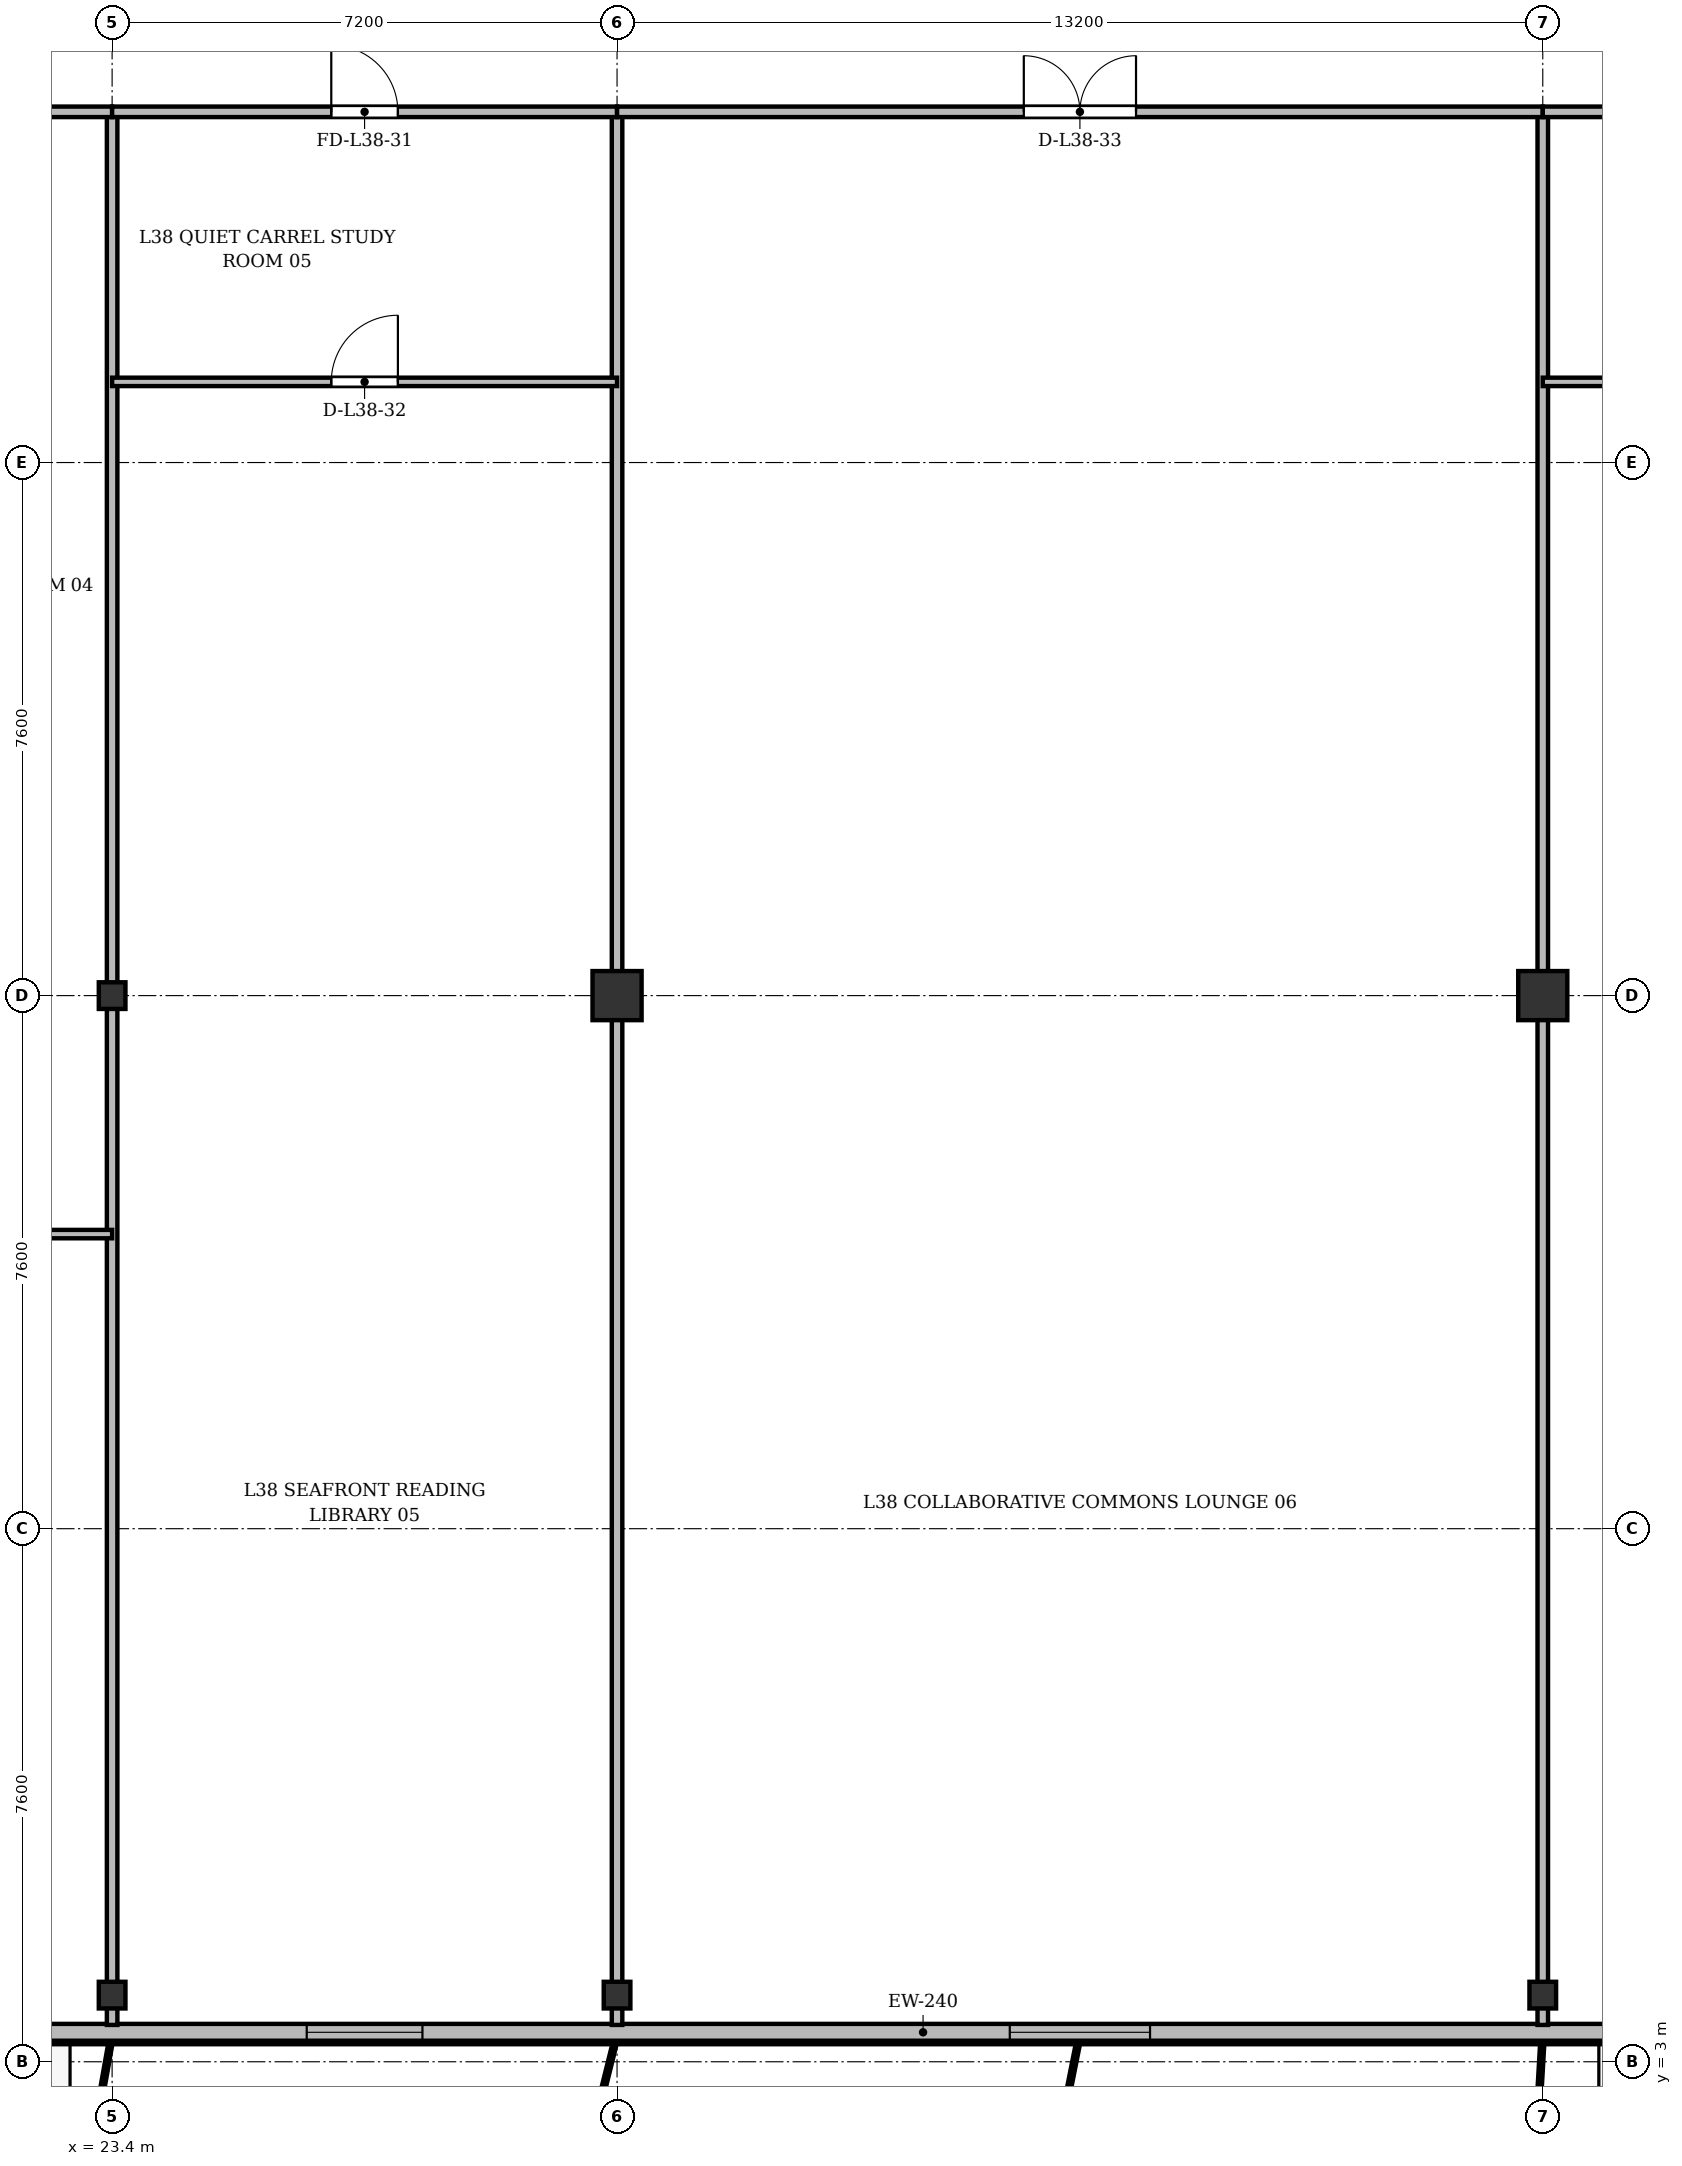
"""IFC4 building model, lengths in metres.
Left out: names, types, materials, properties, quantities, classifications, styles, units other than length and angle.
Written with IfcOpenShell. Run it as: python <this file> out.ifc"""

import sys

from ifc_helpers import new_model, si_unit, direction, frame, frame_2d, origin, origin_2d, place, context, subcontext, project, spatial, rectangle, i_section, extrude, source, transform, mapped, element, fill, save


model = new_model("IFC4")
c1 = context("Model", 3, precision=1e-05, world=origin(), true_north=direction((0.0, 1.0)))
c2 = subcontext(c1, "Body", "Model", "MODEL_VIEW")
j1 = project(units=[si_unit("LENGTHUNIT", "METRE"), si_unit("PLANEANGLEUNIT", "RADIAN")], contexts=[c1])
p1 = place(None, origin())
s1 = spatial("IfcSite", under=j1, at=p1, CompositionType="ELEMENT")
p2 = place(p1, origin())
s2 = spatial("IfcBuilding", under=s1, at=p2, CompositionType="ELEMENT")
p3 = place(p2, frame((0.0, 0.0, 146.5)))
s3 = spatial("IfcBuildingStorey", under=s2, at=p3, CompositionType="ELEMENT", Elevation=146.5)
m1 = source(origin(), c2, "Body", "SweptSolid", [
    extrude(i_section(OverallWidth=0.38, OverallDepth=0.38, WebThickness=0.02, FlangeThickness=0.03, at=origin_2d()), origin(), (0.0, 0.0, 1.0), 3.6),
])
for number, where, z_axis, x_axis in (
    (1, (23.4, 3.95, 0.0), (0.0, 0.0, 1.0), (1.0, 0.0, 0.0)),
    (2, (23.4, 18.2, 0.0), (0.0, 0.0, 1.0), (1.0, 0.0, 0.0)),
    (3, (30.6, 3.95, 0.0), (0.0, 0.0, 1.0), (1.0, 0.0, 0.0)),
):
    element("IfcColumn", number, at=place(p3, frame(where, z_axis=z_axis, x_axis=x_axis)), inside=s3, PredefinedType="COLUMN", context=c2, shape_type="MappedRepresentation", body=[
        mapped(m1, transform((0.0, 0.0, 0.0), x_axis=(1.0, 0.0, 0.0), y_axis=(0.0, 1.0, 0.0), z_axis=(0.0, 0.0, 1.0), scale=1.0)),
    ])
m2 = source(origin(), c2, "Body", "SweptSolid", [
    extrude(rectangle(XDim=0.7, YDim=0.7, at=origin_2d()), origin(), (0.0, 0.0, 1.0), 3.6),
])
p4 = place(p3, frame((30.6, 18.2, 0.0), z_axis=(0.0, 0.0, 1.0), x_axis=(1.0, 0.0, 0.0)))
e4 = element("IfcColumn", 4, at=p4, inside=s3, PredefinedType="COLUMN", context=c2, shape_type="MappedRepresentation", body=[
    mapped(m2, transform((0.0, 0.0, 0.0), x_axis=(1.0, 0.0, 0.0), y_axis=(0.0, 1.0, 0.0), z_axis=(0.0, 0.0, 1.0), scale=1.0)),
])
p5 = place(p3, frame((43.8, 3.95, 0.0), z_axis=(0.0, 0.0, 1.0), x_axis=(1.0, 0.0, 0.0)))
e5 = element("IfcColumn", 5, at=p5, inside=s3, PredefinedType="COLUMN", context=c2, shape_type="MappedRepresentation", body=[
    mapped(m1, transform((0.0, 0.0, 0.0), x_axis=(1.0, 0.0, 0.0), y_axis=(0.0, 1.0, 0.0), z_axis=(0.0, 0.0, 1.0), scale=1.0)),
])
p6 = place(p3, frame((43.8, 18.2, 0.0), z_axis=(0.0, 0.0, 1.0), x_axis=(1.0, 0.0, 0.0)))
e6 = element("IfcColumn", 6, at=p6, inside=s3, PredefinedType="COLUMN", context=c2, shape_type="MappedRepresentation", body=[
    mapped(m2, transform((0.0, 0.0, 0.0), x_axis=(1.0, 0.0, 0.0), y_axis=(0.0, 1.0, 0.0), z_axis=(0.0, 0.0, 1.0), scale=1.0)),
])
p7 = place(p3, frame((63.6, 3.42, 0.0), z_axis=(0.0, 0.0, 1.0), x_axis=(-1.0, 0.0, 0.0)))
e7 = element("IfcWall", 7, at=p7, inside=s3, PredefinedType="SOLIDWALL", context=c2, shape_type="SweptSolid", body=[
    extrude(rectangle(XDim=52.8, YDim=0.24, at=frame_2d((26.4, 0.0))), origin(), (0.0, 0.0, 1.0), 3.35),
])
p8 = place(p7, frame((1.445, 0.0, 0.9)))
e8 = element("IfcOpeningElement", 8, at=p8, cuts=e7, PredefinedType="OPENING", context=c2, shape_type="SweptSolid", body=[
    extrude(rectangle(XDim=2.0, YDim=1.95, at=frame_2d((1.0, 0.975))), frame((0.0, 0.13, 0.0), z_axis=(0.0, -1.0, 0.0), x_axis=(1.0, 0.0, 0.0)), (0.0, 0.0, 1.0), 0.26),
])
p9 = place(p7, frame((5.275, 0.0, 0.9)))
e9 = element("IfcOpeningElement", 9, at=p9, cuts=e7, PredefinedType="OPENING", context=c2, shape_type="SweptSolid", body=[
    extrude(rectangle(XDim=1.65, YDim=1.85, at=frame_2d((0.825, 0.925))), frame((0.0, 0.13, 0.0), z_axis=(0.0, -1.0, 0.0), x_axis=(1.0, 0.0, 0.0)), (0.0, 0.0, 1.0), 0.26),
])
p10 = place(p7, frame((7.65, 0.0, 0.9)))
e10 = element("IfcOpeningElement", 10, at=p10, cuts=e7, PredefinedType="OPENING", context=c2, shape_type="SweptSolid", body=[
    extrude(rectangle(XDim=1.5, YDim=1.75, at=frame_2d((0.75, 0.875))), frame((0.0, 0.13, 0.0), z_axis=(0.0, -1.0, 0.0), x_axis=(1.0, 0.0, 0.0)), (0.0, 0.0, 1.0), 0.26),
])
p11 = place(p7, frame((9.9, 0.0, 0.9)))
e11 = element("IfcOpeningElement", 11, at=p11, cuts=e7, PredefinedType="OPENING", context=c2, shape_type="SweptSolid", body=[
    extrude(rectangle(XDim=2.2, YDim=1.8, at=frame_2d((1.1, 0.9))), frame((0.0, 0.13, 0.0), z_axis=(0.0, -1.0, 0.0), x_axis=(1.0, 0.0, 0.0)), (0.0, 0.0, 1.0), 0.26),
])
p12 = place(p7, frame((14.417, 0.0, 0.0)))
e12 = element("IfcOpeningElement", 12, at=p12, cuts=e7, PredefinedType="OPENING", context=c2, shape_type="SweptSolid", body=[
    extrude(rectangle(XDim=1.2, YDim=2.2, at=frame_2d((0.6, 1.1))), frame((0.0, 0.13, 0.0), z_axis=(0.0, -1.0, 0.0), x_axis=(1.0, 0.0, 0.0)), (0.0, 0.0, 1.0), 0.26),
])
p13 = place(p7, frame((25.4, 0.0, 0.9)))
e13 = element("IfcOpeningElement", 13, at=p13, cuts=e7, PredefinedType="OPENING", context=c2, shape_type="SweptSolid", body=[
    extrude(rectangle(XDim=2.0, YDim=1.95, at=frame_2d((1.0, 0.975))), frame((0.0, 0.13, 0.0), z_axis=(0.0, -1.0, 0.0), x_axis=(1.0, 0.0, 0.0)), (0.0, 0.0, 1.0), 0.26),
])
p14 = place(p7, frame((35.775, 0.0, 0.9)))
e14 = element("IfcOpeningElement", 14, at=p14, cuts=e7, PredefinedType="OPENING", context=c2, shape_type="SweptSolid", body=[
    extrude(rectangle(XDim=1.65, YDim=1.85, at=frame_2d((0.825, 0.925))), frame((0.0, 0.13, 0.0), z_axis=(0.0, -1.0, 0.0), x_axis=(1.0, 0.0, 0.0)), (0.0, 0.0, 1.0), 0.26),
])
p15 = place(p7, frame((41.656, 0.0, 0.0)))
e15 = element("IfcOpeningElement", 15, at=p15, cuts=e7, PredefinedType="OPENING", context=c2, shape_type="SweptSolid", body=[
    extrude(rectangle(XDim=1.2, YDim=2.2, at=frame_2d((0.6, 1.1))), frame((0.0, 0.13, 0.0), z_axis=(0.0, -1.0, 0.0), x_axis=(1.0, 0.0, 0.0)), (0.0, 0.0, 1.0), 0.26),
])
p16 = place(p7, frame((43.65, 0.0, 0.9)))
e16 = element("IfcOpeningElement", 16, at=p16, cuts=e7, PredefinedType="OPENING", context=c2, shape_type="SweptSolid", body=[
    extrude(rectangle(XDim=1.5, YDim=1.75, at=frame_2d((0.75, 0.875))), frame((0.0, 0.13, 0.0), z_axis=(0.0, -1.0, 0.0), x_axis=(1.0, 0.0, 0.0)), (0.0, 0.0, 1.0), 0.26),
])
p17 = place(p7, frame((45.95, 0.0, 0.9)))
e17 = element("IfcOpeningElement", 17, at=p17, cuts=e7, PredefinedType="OPENING", context=c2, shape_type="SweptSolid", body=[
    extrude(rectangle(XDim=1.5, YDim=1.75, at=frame_2d((0.75, 0.875))), frame((0.0, 0.13, 0.0), z_axis=(0.0, -1.0, 0.0), x_axis=(1.0, 0.0, 0.0)), (0.0, 0.0, 1.0), 0.26),
])
p18 = place(p7, frame((49.355, 0.0, 0.9)))
e18 = element("IfcOpeningElement", 18, at=p18, cuts=e7, PredefinedType="OPENING", context=c2, shape_type="SweptSolid", body=[
    extrude(rectangle(XDim=2.0, YDim=1.95, at=frame_2d((1.0, 0.975))), frame((0.0, 0.13, 0.0), z_axis=(0.0, -1.0, 0.0), x_axis=(1.0, 0.0, 0.0)), (0.0, 0.0, 1.0), 0.26),
])
for number, where, z_axis, x_axis in (
    (19, (23.4, 3.525, 0.0), (0.0, 0.0, 1.0), (0.0, 1.0, 0.0)),
    (20, (30.6, 3.525, 0.0), (0.0, 0.0, 1.0), (0.0, 1.0, 0.0)),
    (21, (43.8, 3.525, 0.0), (0.0, 0.0, 1.0), (0.0, 1.0, 0.0)),
):
    element("IfcWall", number, at=place(p3, frame(where, z_axis=z_axis, x_axis=x_axis)), inside=s3, PredefinedType="PARTITIONING", context=c2, shape_type="SweptSolid", body=[
        extrude(rectangle(XDim=27.275, YDim=0.15, at=frame_2d((13.638, 0.0))), origin(), (0.0, 0.0, 1.0), 2.85),
    ])
p19 = place(p3, frame((20.2, 30.8, 0.0), z_axis=(0.0, 0.0, 1.0), x_axis=(1.0, 0.0, 0.0)))
e22 = element("IfcWall", 22, at=p19, inside=s3, PredefinedType="PARTITIONING", context=c2, shape_type="SweptSolid", body=[
    extrude(rectangle(XDim=3.2, YDim=0.15, at=frame_2d((1.6, 0.0))), origin(), (0.0, 0.0, 1.0), 2.85),
])
p20 = place(p19, frame((1.125, 0.0, 0.0)))
e23 = element("IfcOpeningElement", 23, at=p20, cuts=e22, PredefinedType="OPENING", context=c2, shape_type="SweptSolid", body=[
    extrude(rectangle(XDim=0.95, YDim=2.15, at=frame_2d((0.475, 1.075))), frame((0.0, 0.085, 0.0), z_axis=(0.0, -1.0, 0.0), x_axis=(1.0, 0.0, 0.0)), (0.0, 0.0, 1.0), 0.17),
])
p21 = place(p3, frame((20.2, 14.8, 0.0), z_axis=(0.0, 0.0, 1.0), x_axis=(1.0, 0.0, 0.0)))
e24 = element("IfcWall", 24, at=p21, inside=s3, PredefinedType="PARTITIONING", context=c2, shape_type="SweptSolid", body=[
    extrude(rectangle(XDim=3.2, YDim=0.12, at=frame_2d((1.6, 0.0))), origin(), (0.0, 0.0, 1.0), 2.85),
])
p22 = place(p21, frame((1.125, 0.0, 0.0)))
e25 = element("IfcOpeningElement", 25, at=p22, cuts=e24, PredefinedType="OPENING", context=c2, shape_type="SweptSolid", body=[
    extrude(rectangle(XDim=0.95, YDim=2.15, at=frame_2d((0.475, 1.075))), frame((0.0, 0.07, 0.0), z_axis=(0.0, -1.0, 0.0), x_axis=(1.0, 0.0, 0.0)), (0.0, 0.0, 1.0), 0.14),
])
p23 = place(p3, frame((23.4, 30.8, 0.0), z_axis=(0.0, 0.0, 1.0), x_axis=(1.0, 0.0, 0.0)))
e26 = element("IfcWall", 26, at=p23, inside=s3, PredefinedType="PARTITIONING", context=c2, shape_type="SweptSolid", body=[
    extrude(rectangle(XDim=7.2, YDim=0.15, at=frame_2d((3.6, 0.0))), origin(), (0.0, 0.0, 1.0), 2.85),
])
p24 = place(p23, frame((3.125, 0.0, 0.0)))
e27 = element("IfcOpeningElement", 27, at=p24, cuts=e26, PredefinedType="OPENING", context=c2, shape_type="SweptSolid", body=[
    extrude(rectangle(XDim=0.95, YDim=2.15, at=frame_2d((0.475, 1.075))), frame((0.0, 0.085, 0.0), z_axis=(0.0, -1.0, 0.0), x_axis=(1.0, 0.0, 0.0)), (0.0, 0.0, 1.0), 0.17),
])
p25 = place(p3, frame((23.4, 26.95, 0.0), z_axis=(0.0, 0.0, 1.0), x_axis=(1.0, 0.0, 0.0)))
e28 = element("IfcWall", 28, at=p25, inside=s3, PredefinedType="PARTITIONING", context=c2, shape_type="SweptSolid", body=[
    extrude(rectangle(XDim=7.2, YDim=0.12, at=frame_2d((3.6, 0.0))), origin(), (0.0, 0.0, 1.0), 2.85),
])
p26 = place(p25, frame((3.125, 0.0, 0.0)))
e29 = element("IfcOpeningElement", 29, at=p26, cuts=e28, PredefinedType="OPENING", context=c2, shape_type="SweptSolid", body=[
    extrude(rectangle(XDim=0.95, YDim=2.15, at=frame_2d((0.475, 1.075))), frame((0.0, 0.07, 0.0), z_axis=(0.0, -1.0, 0.0), x_axis=(1.0, 0.0, 0.0)), (0.0, 0.0, 1.0), 0.14),
])
p27 = place(p3, frame((30.6, 30.8, 0.0), z_axis=(0.0, 0.0, 1.0), x_axis=(1.0, 0.0, 0.0)))
e30 = element("IfcWall", 30, at=p27, inside=s3, PredefinedType="PARTITIONING", context=c2, shape_type="SweptSolid", body=[
    extrude(rectangle(XDim=13.2, YDim=0.15, at=frame_2d((6.6, 0.0))), origin(), (0.0, 0.0, 1.0), 2.85),
])
p28 = place(p27, frame((5.8, 0.0, 0.0)))
e31 = element("IfcOpeningElement", 31, at=p28, cuts=e30, PredefinedType="OPENING", context=c2, shape_type="SweptSolid", body=[
    extrude(rectangle(XDim=1.6, YDim=2.2, at=frame_2d((0.8, 1.1))), frame((0.0, 0.085, 0.0), z_axis=(0.0, -1.0, 0.0), x_axis=(1.0, 0.0, 0.0)), (0.0, 0.0, 1.0), 0.17),
])
p29 = place(p3, frame((43.8, 30.8, 0.0), z_axis=(0.0, 0.0, 1.0), x_axis=(1.0, 0.0, 0.0)))
e32 = element("IfcWall", 32, at=p29, inside=s3, PredefinedType="PARTITIONING", context=c2, shape_type="SweptSolid", body=[
    extrude(rectangle(XDim=7.2, YDim=0.15, at=frame_2d((3.6, 0.0))), origin(), (0.0, 0.0, 1.0), 2.85),
])
p30 = place(p29, frame((3.125, 0.0, 0.0)))
e33 = element("IfcOpeningElement", 33, at=p30, cuts=e32, PredefinedType="OPENING", context=c2, shape_type="SweptSolid", body=[
    extrude(rectangle(XDim=0.95, YDim=2.15, at=frame_2d((0.475, 1.075))), frame((0.0, 0.085, 0.0), z_axis=(0.0, -1.0, 0.0), x_axis=(1.0, 0.0, 0.0)), (0.0, 0.0, 1.0), 0.17),
])
p31 = place(p3, frame((43.8, 26.95, 0.0), z_axis=(0.0, 0.0, 1.0), x_axis=(1.0, 0.0, 0.0)))
e34 = element("IfcWall", 34, at=p31, inside=s3, PredefinedType="PARTITIONING", context=c2, shape_type="SweptSolid", body=[
    extrude(rectangle(XDim=7.2, YDim=0.12, at=frame_2d((3.6, 0.0))), origin(), (0.0, 0.0, 1.0), 2.85),
])
p32 = place(p31, frame((3.125, 0.0, 0.0)))
e35 = element("IfcOpeningElement", 35, at=p32, cuts=e34, PredefinedType="OPENING", context=c2, shape_type="SweptSolid", body=[
    extrude(rectangle(XDim=0.95, YDim=2.15, at=frame_2d((0.475, 1.075))), frame((0.0, 0.07, 0.0), z_axis=(0.0, -1.0, 0.0), x_axis=(1.0, 0.0, 0.0)), (0.0, 0.0, 1.0), 0.14),
])
m3 = source(origin(), c2, "Body", "SweptSolid", [
    extrude(rectangle(XDim=2.0, YDim=1.95, at=frame_2d((1.0, 0.975))), frame((0.0, 0.03, 0.0), z_axis=(0.0, -1.0, 0.0), x_axis=(1.0, 0.0, 0.0)), (0.0, 0.0, 1.0), 0.06),
])
p33 = place(p13, origin())
e36 = element("IfcWindow", 36, at=p33, inside=s3, PartitioningType="SINGLE_PANEL", PredefinedType="WINDOW", context=c2, shape_type="MappedRepresentation", body=[
    mapped(m3, transform((0.0, 0.0, 0.0), x_axis=(1.0, 0.0, 0.0), y_axis=(0.0, 1.0, 0.0), z_axis=(0.0, 0.0, 1.0), scale=1.0)),
])
fill(e13, e36)
m4 = source(origin(), c2, "Body", "SweptSolid", [
    extrude(rectangle(XDim=1.65, YDim=1.85, at=frame_2d((0.825, 0.925))), frame((0.0, 0.03, 0.0), z_axis=(0.0, -1.0, 0.0), x_axis=(1.0, 0.0, 0.0)), (0.0, 0.0, 1.0), 0.06),
])
p34 = place(p14, origin())
e37 = element("IfcWindow", 37, at=p34, inside=s3, PartitioningType="SINGLE_PANEL", PredefinedType="WINDOW", context=c2, shape_type="MappedRepresentation", body=[
    mapped(m4, transform((0.0, 0.0, 0.0), x_axis=(1.0, 0.0, 0.0), y_axis=(0.0, 1.0, 0.0), z_axis=(0.0, 0.0, 1.0), scale=1.0)),
])
fill(e14, e37)
m5 = source(origin(), c2, "Body", "SweptSolid", [
    extrude(rectangle(XDim=0.95, YDim=2.15, at=frame_2d((0.475, 1.075))), frame((0.0, 0.025, 0.0), z_axis=(0.0, -1.0, 0.0), x_axis=(1.0, 0.0, 0.0)), (0.0, 0.0, 1.0), 0.05),
])
p35 = place(p24, origin())
e38 = element("IfcDoor", 38, at=p35, inside=s3, OperationType="SINGLE_SWING_LEFT", PredefinedType="DOOR", context=c2, shape_type="MappedRepresentation", body=[
    mapped(m5, transform((0.0, 0.0, 0.0), x_axis=(1.0, 0.0, 0.0), y_axis=(0.0, 1.0, 0.0), z_axis=(0.0, 0.0, 1.0), scale=1.0)),
])
fill(e27, e38)
p36 = place(p26, origin())
e39 = element("IfcDoor", 39, at=p36, inside=s3, OperationType="SINGLE_SWING_RIGHT", PredefinedType="DOOR", context=c2, shape_type="MappedRepresentation", body=[
    mapped(m5, transform((0.0, 0.0, 0.0), x_axis=(1.0, 0.0, 0.0), y_axis=(0.0, 1.0, 0.0), z_axis=(0.0, 0.0, 1.0), scale=1.0)),
])
fill(e29, e39)
m6 = source(origin(), c2, "Body", "SweptSolid", [
    extrude(rectangle(XDim=1.6, YDim=2.2, at=frame_2d((0.8, 1.1))), frame((0.0, 0.025, 0.0), z_axis=(0.0, -1.0, 0.0), x_axis=(1.0, 0.0, 0.0)), (0.0, 0.0, 1.0), 0.05),
])
p37 = place(p28, origin())
e40 = element("IfcDoor", 40, at=p37, inside=s3, OperationType="DOUBLE_DOOR_SINGLE_SWING", PredefinedType="DOOR", context=c2, shape_type="MappedRepresentation", body=[
    mapped(m6, transform((0.0, 0.0, 0.0), x_axis=(1.0, 0.0, 0.0), y_axis=(0.0, 1.0, 0.0), z_axis=(0.0, 0.0, 1.0), scale=1.0)),
])
fill(e31, e40)
save(model, sys.argv[1])
